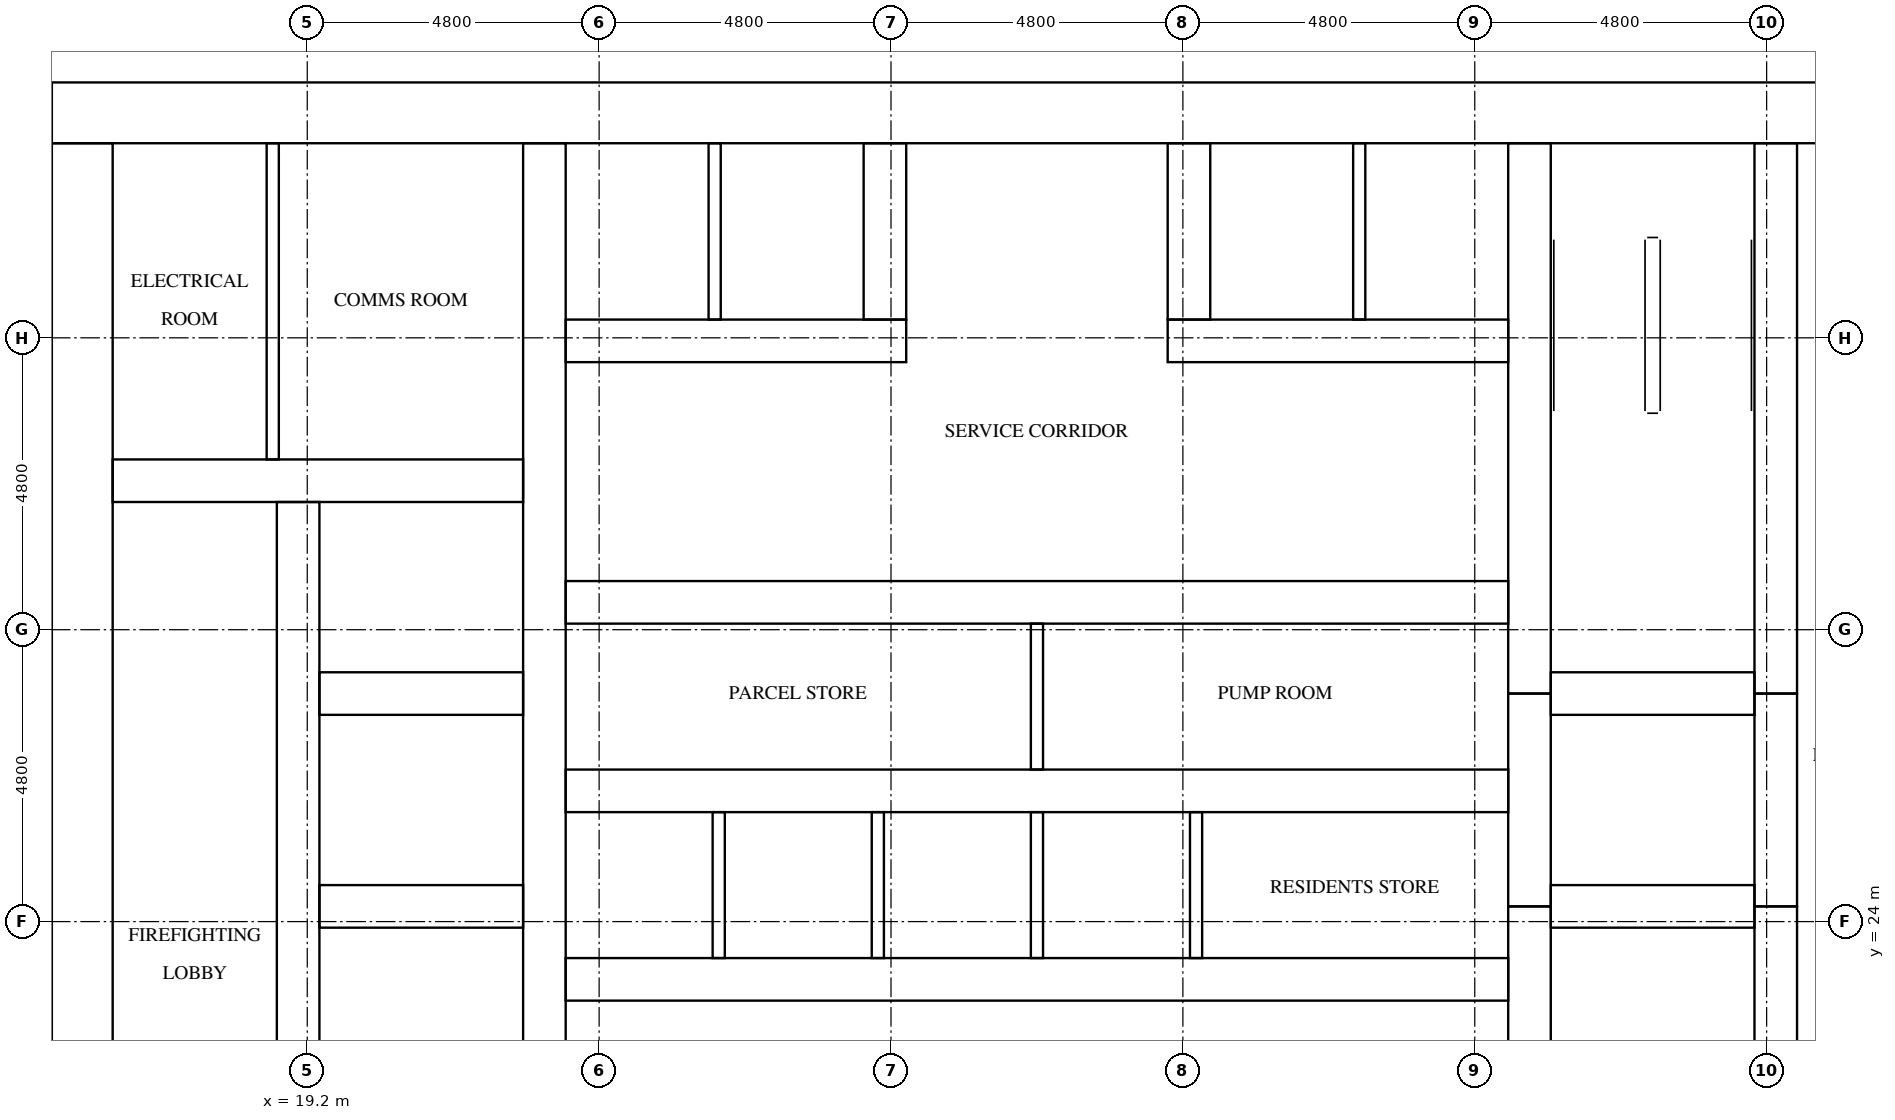
"""IFC4 building model, lengths in metres.
Left out: names, types, materials, properties, quantities, classifications, styles, units other than length and angle.
Written with IfcOpenShell. Run it as: python <this file> out.ifc"""

import sys

from ifc_helpers import new_model, si_unit, direction, frame, frame_2d, origin, place, context, subcontext, project, spatial, rectangle, extrude, element, fill, save


model = new_model("IFC4")
c1 = context("Model", 3, precision=1e-05, world=origin(), true_north=direction((0.0, 1.0)))
c2 = subcontext(c1, "Body", "Model", "MODEL_VIEW")
j1 = project(units=[si_unit("LENGTHUNIT", "METRE"), si_unit("PLANEANGLEUNIT", "RADIAN")], contexts=[c1])
p1 = place(None, origin())
s1 = spatial("IfcSite", under=j1, at=p1, CompositionType="ELEMENT")
p2 = place(p1, origin())
s2 = spatial("IfcBuilding", under=s1, at=p2, CompositionType="ELEMENT")
p3 = place(p2, frame((0.0, 0.0, 29.4)))
s3 = spatial("IfcBuildingStorey", under=s2, at=p3, CompositionType="ELEMENT", Elevation=29.4)
p4 = place(p3, frame((15.0, 37.3, 0.0), z_axis=(0.0, 0.0, 1.0), x_axis=(1.0, 0.0, 0.0)))
e1 = element("IfcWall", 1, at=p4, inside=s3, PredefinedType="SHEAR", context=c2, shape_type="SweptSolid", body=[
    extrude(rectangle(XDim=32.4, YDim=1.0, at=frame_2d((16.2, 0.0))), origin(), (0.0, 0.0, 1.0), 3.2),
])
p5 = place(p4, frame((15.3, 0.0, 0.0)))
e2 = element("IfcOpeningElement", 2, at=p5, cuts=e1, PredefinedType="OPENING", context=c2, shape_type="SweptSolid", body=[
    extrude(rectangle(XDim=1.8, YDim=2.1, at=frame_2d((0.9, 1.05))), frame((0.0, 0.51, 0.0), z_axis=(0.0, -1.0, 0.0), x_axis=(1.0, 0.0, 0.0)), (0.0, 0.0, 1.0), 1.02),
])
p6 = place(p4, frame((1.766, 0.0, 0.0)))
e3 = element("IfcOpeningElement", 3, at=p6, cuts=e1, PredefinedType="OPENING", context=c2, shape_type="SweptSolid", body=[
    extrude(rectangle(XDim=1.0, YDim=2.1, at=frame_2d((0.5, 1.05))), frame((0.0, 0.51, 0.0), z_axis=(0.0, -1.0, 0.0), x_axis=(1.0, 0.0, 0.0)), (0.0, 0.0, 1.0), 1.02),
])
p7 = place(p4, frame((5.241, 0.0, 0.0)))
e4 = element("IfcOpeningElement", 4, at=p7, cuts=e1, PredefinedType="OPENING", context=c2, shape_type="SweptSolid", body=[
    extrude(rectangle(XDim=1.0, YDim=2.1, at=frame_2d((0.5, 1.05))), frame((0.0, 0.51, 0.0), z_axis=(0.0, -1.0, 0.0), x_axis=(1.0, 0.0, 0.0)), (0.0, 0.0, 1.0), 1.02),
])
p8 = place(p3, frame((15.5, 16.0, 0.0), z_axis=(0.0, 0.0, 1.0), x_axis=(0.0, 1.0, 0.0)))
e5 = element("IfcWall", 5, at=p8, inside=s3, PredefinedType="SHEAR", context=c2, shape_type="SweptSolid", body=[
    extrude(rectangle(XDim=20.8, YDim=1.0, at=frame_2d((10.4, 0.0))), origin(), (0.0, 0.0, 1.0), 3.2),
])
p9 = place(p8, frame((4.76, 0.0, 0.0)))
e6 = element("IfcOpeningElement", 6, at=p9, cuts=e5, PredefinedType="OPENING", context=c2, shape_type="SweptSolid", body=[
    extrude(rectangle(XDim=1.2, YDim=2.1, at=frame_2d((0.6, 1.05))), frame((0.0, 0.51, 0.0), z_axis=(0.0, -1.0, 0.0), x_axis=(1.0, 0.0, 0.0)), (0.0, 0.0, 1.0), 1.02),
])
p10 = place(p3, frame((19.05, 16.0, 0.0), z_axis=(0.0, 0.0, 1.0), x_axis=(0.0, 1.0, 0.0)))
e7 = element("IfcWall", 7, at=p10, inside=s3, PredefinedType="SHEAR", context=c2, shape_type="SweptSolid", body=[
    extrude(rectangle(XDim=14.9, YDim=0.7, at=frame_2d((7.45, 0.0))), origin(), (0.0, 0.0, 1.0), 3.2),
])
p11 = place(p10, frame((9.45, 0.0, 0.0)))
e8 = element("IfcOpeningElement", 8, at=p11, cuts=e7, PredefinedType="OPENING", context=c2, shape_type="SweptSolid", body=[
    extrude(rectangle(XDim=1.1, YDim=2.1, at=frame_2d((0.55, 1.05))), frame((0.0, 0.36, 0.0), z_axis=(0.0, -1.0, 0.0), x_axis=(1.0, 0.0, 0.0)), (0.0, 0.0, 1.0), 0.72),
])
p12 = place(p10, frame((12.95, 0.0, 0.0)))
e9 = element("IfcOpeningElement", 9, at=p12, cuts=e7, PredefinedType="OPENING", context=c2, shape_type="SweptSolid", body=[
    extrude(rectangle(XDim=1.1, YDim=2.1, at=frame_2d((0.55, 1.05))), frame((0.0, 0.36, 0.0), z_axis=(0.0, -1.0, 0.0), x_axis=(1.0, 0.0, 0.0)), (0.0, 0.0, 1.0), 0.72),
])
p13 = place(p10, frame((0.2, 0.0, 0.0)))
e10 = element("IfcOpeningElement", 10, at=p13, cuts=e7, PredefinedType="OPENING", context=c2, shape_type="SweptSolid", body=[
    extrude(rectangle(XDim=1.2, YDim=2.1, at=frame_2d((0.6, 1.05))), frame((0.0, 0.36, 0.0), z_axis=(0.0, -1.0, 0.0), x_axis=(1.0, 0.0, 0.0)), (0.0, 0.0, 1.0), 0.72),
])
p14 = place(p3, frame((23.1, 16.0, 0.0), z_axis=(0.0, 0.0, 1.0), x_axis=(0.0, 1.0, 0.0)))
e11 = element("IfcWall", 11, at=p14, inside=s3, PredefinedType="SHEAR", context=c2, shape_type="SweptSolid", body=[
    extrude(rectangle(XDim=20.8, YDim=0.7, at=frame_2d((10.4, 0.0))), origin(), (0.0, 0.0, 1.0), 3.2),
])
p15 = place(p3, frame((39.3, 16.0, 0.0), z_axis=(0.0, 0.0, 1.0), x_axis=(0.0, 1.0, 0.0)))
e12 = element("IfcWall", 12, at=p15, inside=s3, PredefinedType="SHEAR", context=c2, shape_type="SweptSolid", body=[
    extrude(rectangle(XDim=8.25, YDim=0.7, at=frame_2d((4.125, 0.0))), origin(), (0.0, 0.0, 1.0), 3.2),
])
p16 = place(p3, frame((39.3, 24.25, 0.0), z_axis=(0.0, 0.0, 1.0), x_axis=(0.0, 1.0, 0.0)))
e13 = element("IfcWall", 13, at=p16, inside=s3, PredefinedType="SHEAR", context=c2, shape_type="SweptSolid", body=[
    extrude(rectangle(XDim=3.5, YDim=0.7, at=frame_2d((1.75, 0.0))), origin(), (0.0, 0.0, 1.0), 3.2),
])
p17 = place(p3, frame((39.3, 27.75, 0.0), z_axis=(0.0, 0.0, 1.0), x_axis=(0.0, 1.0, 0.0)))
e14 = element("IfcWall", 14, at=p17, inside=s3, PredefinedType="SHEAR", context=c2, shape_type="SweptSolid", body=[
    extrude(rectangle(XDim=9.05, YDim=0.7, at=frame_2d((4.525, 0.0))), origin(), (0.0, 0.0, 1.0), 3.2),
])
p18 = place(p3, frame((43.35, 16.0, 0.0), z_axis=(0.0, 0.0, 1.0), x_axis=(0.0, 1.0, 0.0)))
e15 = element("IfcWall", 15, at=p18, inside=s3, PredefinedType="SHEAR", context=c2, shape_type="SweptSolid", body=[
    extrude(rectangle(XDim=8.25, YDim=0.7, at=frame_2d((4.125, 0.0))), origin(), (0.0, 0.0, 1.0), 3.2),
])
p19 = place(p18, frame((0.2, 0.0, 0.0)))
e16 = element("IfcOpeningElement", 16, at=p19, cuts=e15, PredefinedType="OPENING", context=c2, shape_type="SweptSolid", body=[
    extrude(rectangle(XDim=1.2, YDim=2.1, at=frame_2d((0.6, 1.05))), frame((0.0, 0.36, 0.0), z_axis=(0.0, -1.0, 0.0), x_axis=(1.0, 0.0, 0.0)), (0.0, 0.0, 1.0), 0.72),
])
p20 = place(p3, frame((43.35, 24.25, 0.0), z_axis=(0.0, 0.0, 1.0), x_axis=(0.0, 1.0, 0.0)))
e17 = element("IfcWall", 17, at=p20, inside=s3, PredefinedType="SHEAR", context=c2, shape_type="SweptSolid", body=[
    extrude(rectangle(XDim=3.5, YDim=0.7, at=frame_2d((1.75, 0.0))), origin(), (0.0, 0.0, 1.0), 3.2),
])
p21 = place(p20, frame((1.2, 0.0, 0.0)))
e18 = element("IfcOpeningElement", 18, at=p21, cuts=e17, PredefinedType="OPENING", context=c2, shape_type="SweptSolid", body=[
    extrude(rectangle(XDim=1.1, YDim=2.1, at=frame_2d((0.55, 1.05))), frame((0.0, 0.36, 0.0), z_axis=(0.0, -1.0, 0.0), x_axis=(1.0, 0.0, 0.0)), (0.0, 0.0, 1.0), 0.72),
])
p22 = place(p3, frame((43.35, 27.75, 0.0), z_axis=(0.0, 0.0, 1.0), x_axis=(0.0, 1.0, 0.0)))
e19 = element("IfcWall", 19, at=p22, inside=s3, PredefinedType="SHEAR", context=c2, shape_type="SweptSolid", body=[
    extrude(rectangle(XDim=9.05, YDim=0.7, at=frame_2d((4.525, 0.0))), origin(), (0.0, 0.0, 1.0), 3.2),
])
p23 = place(p22, frame((7.65, 0.0, 0.0)))
e20 = element("IfcOpeningElement", 20, at=p23, cuts=e19, PredefinedType="OPENING", context=c2, shape_type="SweptSolid", body=[
    extrude(rectangle(XDim=1.2, YDim=2.1, at=frame_2d((0.6, 1.05))), frame((0.0, 0.36, 0.0), z_axis=(0.0, -1.0, 0.0), x_axis=(1.0, 0.0, 0.0)), (0.0, 0.0, 1.0), 0.72),
])
for number, where, z_axis, x_axis in (
    (21, (19.4, 24.25, 0.0), (0.0, 0.0, 1.0), (1.0, 0.0, 0.0)),
    (22, (19.4, 27.75, 0.0), (0.0, 0.0, 1.0), (1.0, 0.0, 0.0)),
):
    element("IfcWall", number, at=place(p3, frame(where, z_axis=z_axis, x_axis=x_axis)), inside=s3, PredefinedType="SHEAR", context=c2, shape_type="SweptSolid", body=[
        extrude(rectangle(XDim=3.35, YDim=0.7, at=frame_2d((1.675, 0.0))), origin(), (0.0, 0.0, 1.0), 3.2),
    ])
p24 = place(p3, frame((16.0, 31.25, 0.0), z_axis=(0.0, 0.0, 1.0), x_axis=(1.0, 0.0, 0.0)))
e23 = element("IfcWall", 23, at=p24, inside=s3, PredefinedType="SHEAR", context=c2, shape_type="SweptSolid", body=[
    extrude(rectangle(XDim=6.75, YDim=0.7, at=frame_2d((3.375, 0.0))), origin(), (0.0, 0.0, 1.0), 3.2),
])
for number, where, z_axis, x_axis in (
    (24, (39.65, 24.25, 0.0), (0.0, 0.0, 1.0), (1.0, 0.0, 0.0)),
    (25, (39.65, 27.75, 0.0), (0.0, 0.0, 1.0), (1.0, 0.0, 0.0)),
):
    element("IfcWall", number, at=place(p3, frame(where, z_axis=z_axis, x_axis=x_axis)), inside=s3, PredefinedType="SHEAR", context=c2, shape_type="SweptSolid", body=[
        extrude(rectangle(XDim=3.35, YDim=0.7, at=frame_2d((1.675, 0.0))), origin(), (0.0, 0.0, 1.0), 3.2),
    ])
p25 = place(p3, frame((23.45, 23.05, 0.0), z_axis=(0.0, 0.0, 1.0), x_axis=(1.0, 0.0, 0.0)))
e26 = element("IfcWall", 26, at=p25, inside=s3, PredefinedType="SHEAR", context=c2, shape_type="SweptSolid", body=[
    extrude(rectangle(XDim=15.5, YDim=0.7, at=frame_2d((7.75, 0.0))), origin(), (0.0, 0.0, 1.0), 3.2),
])
p26 = place(p25, frame((0.658, 0.0, 0.0)))
e27 = element("IfcOpeningElement", 27, at=p26, cuts=e26, PredefinedType="OPENING", context=c2, shape_type="SweptSolid", body=[
    extrude(rectangle(XDim=1.1, YDim=2.1, at=frame_2d((0.55, 1.05))), frame((0.0, 0.36, 0.0), z_axis=(0.0, -1.0, 0.0), x_axis=(1.0, 0.0, 0.0)), (0.0, 0.0, 1.0), 0.72),
])
p27 = place(p25, frame((3.275, 0.0, 0.0)))
e28 = element("IfcOpeningElement", 28, at=p27, cuts=e26, PredefinedType="OPENING", context=c2, shape_type="SweptSolid", body=[
    extrude(rectangle(XDim=1.1, YDim=2.1, at=frame_2d((0.55, 1.05))), frame((0.0, 0.36, 0.0), z_axis=(0.0, -1.0, 0.0), x_axis=(1.0, 0.0, 0.0)), (0.0, 0.0, 1.0), 0.72),
])
p28 = place(p25, frame((12.483, 0.0, 0.0)))
e29 = element("IfcOpeningElement", 29, at=p28, cuts=e26, PredefinedType="OPENING", context=c2, shape_type="SweptSolid", body=[
    extrude(rectangle(XDim=1.0, YDim=2.1, at=frame_2d((0.5, 1.05))), frame((0.0, 0.36, 0.0), z_axis=(0.0, -1.0, 0.0), x_axis=(1.0, 0.0, 0.0)), (0.0, 0.0, 1.0), 0.72),
])
p29 = place(p3, frame((23.45, 26.15, 0.0), z_axis=(0.0, 0.0, 1.0), x_axis=(1.0, 0.0, 0.0)))
e30 = element("IfcWall", 30, at=p29, inside=s3, PredefinedType="SHEAR", context=c2, shape_type="SweptSolid", body=[
    extrude(rectangle(XDim=15.5, YDim=0.7, at=frame_2d((7.75, 0.0))), origin(), (0.0, 0.0, 1.0), 3.2),
])
p30 = place(p3, frame((23.45, 29.25, 0.0), z_axis=(0.0, 0.0, 1.0), x_axis=(1.0, 0.0, 0.0)))
e31 = element("IfcWall", 31, at=p30, inside=s3, PredefinedType="SHEAR", context=c2, shape_type="SweptSolid", body=[
    extrude(rectangle(XDim=15.5, YDim=0.7, at=frame_2d((7.75, 0.0))), origin(), (0.0, 0.0, 1.0), 3.2),
])
p31 = place(p30, frame((3.325, 0.0, 0.0)))
e32 = element("IfcOpeningElement", 32, at=p31, cuts=e31, PredefinedType="OPENING", context=c2, shape_type="SweptSolid", body=[
    extrude(rectangle(XDim=1.0, YDim=2.1, at=frame_2d((0.5, 1.05))), frame((0.0, 0.36, 0.0), z_axis=(0.0, -1.0, 0.0), x_axis=(1.0, 0.0, 0.0)), (0.0, 0.0, 1.0), 0.72),
])
p32 = place(p30, frame((11.175, 0.0, 0.0)))
e33 = element("IfcOpeningElement", 33, at=p32, cuts=e31, PredefinedType="OPENING", context=c2, shape_type="SweptSolid", body=[
    extrude(rectangle(XDim=1.0, YDim=2.1, at=frame_2d((0.5, 1.05))), frame((0.0, 0.36, 0.0), z_axis=(0.0, -1.0, 0.0), x_axis=(1.0, 0.0, 0.0)), (0.0, 0.0, 1.0), 0.72),
])
p33 = place(p3, frame((23.45, 33.55, 0.0), z_axis=(0.0, 0.0, 1.0), x_axis=(1.0, 0.0, 0.0)))
e34 = element("IfcWall", 34, at=p33, inside=s3, PredefinedType="SHEAR", context=c2, shape_type="SweptSolid", body=[
    extrude(rectangle(XDim=5.6, YDim=0.7, at=frame_2d((2.8, 0.0))), origin(), (0.0, 0.0, 1.0), 3.2),
])
p34 = place(p3, frame((33.35, 33.55, 0.0), z_axis=(0.0, 0.0, 1.0), x_axis=(1.0, 0.0, 0.0)))
e35 = element("IfcWall", 35, at=p34, inside=s3, PredefinedType="SHEAR", context=c2, shape_type="SweptSolid", body=[
    extrude(rectangle(XDim=5.6, YDim=0.7, at=frame_2d((2.8, 0.0))), origin(), (0.0, 0.0, 1.0), 3.2),
])
for number, where, z_axis, x_axis in (
    (36, (28.7, 33.9, 0.0), (0.0, 0.0, 1.0), (0.0, 1.0, 0.0)),
    (37, (33.7, 33.9, 0.0), (0.0, 0.0, 1.0), (0.0, 1.0, 0.0)),
):
    element("IfcWall", number, at=place(p3, frame(where, z_axis=z_axis, x_axis=x_axis)), inside=s3, PredefinedType="SHEAR", context=c2, shape_type="SweptSolid", body=[
        extrude(rectangle(XDim=2.9, YDim=0.7, at=frame_2d((1.45, 0.0))), origin(), (0.0, 0.0, 1.0), 3.2),
    ])
for number, where, z_axis, x_axis in (
    (38, (25.967, 23.4, 0.0), (0.0, 0.0, 1.0), (0.0, 1.0, 0.0)),
    (39, (28.583, 23.4, 0.0), (0.0, 0.0, 1.0), (0.0, 1.0, 0.0)),
    (40, (31.2, 23.4, 0.0), (0.0, 0.0, 1.0), (0.0, 1.0, 0.0)),
    (41, (33.817, 23.4, 0.0), (0.0, 0.0, 1.0), (0.0, 1.0, 0.0)),
):
    element("IfcWall", number, at=place(p3, frame(where, z_axis=z_axis, x_axis=x_axis)), inside=s3, PredefinedType="SOLIDWALL", context=c2, shape_type="SweptSolid", body=[
        extrude(rectangle(XDim=2.4, YDim=0.2, at=frame_2d((1.2, 0.0))), origin(), (0.0, 0.0, 1.0), 3.2),
    ])
for number, where, z_axis, x_axis in (
    (42, (25.9, 33.9, 0.0), (0.0, 0.0, 1.0), (0.0, 1.0, 0.0)),
    (43, (36.5, 33.9, 0.0), (0.0, 0.0, 1.0), (0.0, 1.0, 0.0)),
):
    element("IfcWall", number, at=place(p3, frame(where, z_axis=z_axis, x_axis=x_axis)), inside=s3, PredefinedType="SOLIDWALL", context=c2, shape_type="SweptSolid", body=[
        extrude(rectangle(XDim=2.9, YDim=0.2, at=frame_2d((1.45, 0.0))), origin(), (0.0, 0.0, 1.0), 3.2),
    ])
p35 = place(p3, frame((18.633, 31.6, 0.0), z_axis=(0.0, 0.0, 1.0), x_axis=(0.0, 1.0, 0.0)))
e44 = element("IfcWall", 44, at=p35, inside=s3, PredefinedType="PARTITIONING", context=c2, shape_type="SweptSolid", body=[
    extrude(rectangle(XDim=5.2, YDim=0.2, at=frame_2d((2.6, 0.0))), origin(), (0.0, 0.0, 1.0), 3.2),
])
p36 = place(p3, frame((31.2, 26.5, 0.0), z_axis=(0.0, 0.0, 1.0), x_axis=(0.0, 1.0, 0.0)))
e45 = element("IfcWall", 45, at=p36, inside=s3, PredefinedType="PARTITIONING", context=c2, shape_type="SweptSolid", body=[
    extrude(rectangle(XDim=2.4, YDim=0.2, at=frame_2d((1.2, 0.0))), origin(), (0.0, 0.0, 1.0), 3.2),
])
p37 = place(p26, origin())
e46 = element("IfcDoor", 46, at=p37, inside=s3, OperationType="DOUBLE_DOOR_SLIDING", PredefinedType="DOOR", context=c2, shape_type="SweptSolid", body=[
    extrude(rectangle(XDim=1.1, YDim=2.1, at=frame_2d((0.55, 1.05))), frame((0.0, 0.025, 0.0), z_axis=(0.0, -1.0, 0.0), x_axis=(1.0, 0.0, 0.0)), (0.0, 0.0, 1.0), 0.05),
])
fill(e27, e46)
p38 = place(p27, origin())
e47 = element("IfcDoor", 47, at=p38, inside=s3, OperationType="DOUBLE_DOOR_SLIDING", PredefinedType="DOOR", context=c2, shape_type="SweptSolid", body=[
    extrude(rectangle(XDim=1.1, YDim=2.1, at=frame_2d((0.55, 1.05))), frame((0.0, 0.025, 0.0), z_axis=(0.0, -1.0, 0.0), x_axis=(1.0, 0.0, 0.0)), (0.0, 0.0, 1.0), 0.05),
])
fill(e28, e47)
p39 = place(p11, origin())
e48 = element("IfcDoor", 48, at=p39, inside=s3, OperationType="DOUBLE_DOOR_SLIDING", PredefinedType="DOOR", context=c2, shape_type="SweptSolid", body=[
    extrude(rectangle(XDim=1.1, YDim=2.1, at=frame_2d((0.55, 1.05))), frame((0.0, 0.025, 0.0), z_axis=(0.0, -1.0, 0.0), x_axis=(1.0, 0.0, 0.0)), (0.0, 0.0, 1.0), 0.05),
])
fill(e8, e48)
p40 = place(p12, origin())
e49 = element("IfcDoor", 49, at=p40, inside=s3, OperationType="DOUBLE_DOOR_SLIDING", PredefinedType="DOOR", context=c2, shape_type="SweptSolid", body=[
    extrude(rectangle(XDim=1.1, YDim=2.1, at=frame_2d((0.55, 1.05))), frame((0.0, 0.025, 0.0), z_axis=(0.0, -1.0, 0.0), x_axis=(1.0, 0.0, 0.0)), (0.0, 0.0, 1.0), 0.05),
])
fill(e9, e49)
p41 = place(p21, origin())
e50 = element("IfcDoor", 50, at=p41, inside=s3, OperationType="DOUBLE_DOOR_SLIDING", PredefinedType="DOOR", context=c2, shape_type="SweptSolid", body=[
    extrude(rectangle(XDim=1.1, YDim=2.1, at=frame_2d((0.55, 1.05))), frame((0.0, 0.025, 0.0), z_axis=(0.0, -1.0, 0.0), x_axis=(1.0, 0.0, 0.0)), (0.0, 0.0, 1.0), 0.05),
])
fill(e18, e50)
p42 = place(p23, origin())
e51 = element("IfcDoor", 51, at=p42, inside=s3, OperationType="SINGLE_SWING_RIGHT", PredefinedType="DOOR", context=c2, shape_type="SweptSolid", body=[
    extrude(rectangle(XDim=1.2, YDim=2.1, at=frame_2d((0.6, 1.05))), frame((0.0, 0.025, 0.0), z_axis=(0.0, -1.0, 0.0), x_axis=(1.0, 0.0, 0.0)), (0.0, 0.0, 1.0), 0.05),
])
fill(e20, e51)
p43 = place(p5, origin())
e52 = element("IfcDoor", 52, at=p43, inside=s3, OperationType="DOUBLE_DOOR_SINGLE_SWING", PredefinedType="DOOR", context=c2, shape_type="SweptSolid", body=[
    extrude(rectangle(XDim=1.8, YDim=2.1, at=frame_2d((0.9, 1.05))), frame((0.0, 0.025, 0.0), z_axis=(0.0, -1.0, 0.0), x_axis=(1.0, 0.0, 0.0)), (0.0, 0.0, 1.0), 0.05),
])
fill(e2, e52)
p44 = place(p6, origin())
e53 = element("IfcDoor", 53, at=p44, inside=s3, OperationType="SINGLE_SWING_LEFT", PredefinedType="DOOR", context=c2, shape_type="SweptSolid", body=[
    extrude(rectangle(XDim=1.0, YDim=2.1, at=frame_2d((0.5, 1.05))), frame((0.0, 0.025, 0.0), z_axis=(0.0, -1.0, 0.0), x_axis=(1.0, 0.0, 0.0)), (0.0, 0.0, 1.0), 0.05),
])
fill(e3, e53)
p45 = place(p7, origin())
e54 = element("IfcDoor", 54, at=p45, inside=s3, OperationType="SINGLE_SWING_RIGHT", PredefinedType="DOOR", context=c2, shape_type="SweptSolid", body=[
    extrude(rectangle(XDim=1.0, YDim=2.1, at=frame_2d((0.5, 1.05))), frame((0.0, 0.025, 0.0), z_axis=(0.0, -1.0, 0.0), x_axis=(1.0, 0.0, 0.0)), (0.0, 0.0, 1.0), 0.05),
])
fill(e4, e54)
p46 = place(p28, frame((1.0, 0.0, 0.0), z_axis=(0.0, 0.0, 1.0), x_axis=(-1.0, 0.0, 0.0)))
e55 = element("IfcDoor", 55, at=p46, inside=s3, OperationType="SINGLE_SWING_LEFT", PredefinedType="DOOR", context=c2, shape_type="SweptSolid", body=[
    extrude(rectangle(XDim=1.0, YDim=2.1, at=frame_2d((0.5, 1.05))), frame((0.0, 0.025, 0.0), z_axis=(0.0, -1.0, 0.0), x_axis=(1.0, 0.0, 0.0)), (0.0, 0.0, 1.0), 0.05),
])
fill(e29, e55)
p47 = place(p31, origin())
e56 = element("IfcDoor", 56, at=p47, inside=s3, OperationType="SINGLE_SWING_RIGHT", PredefinedType="DOOR", context=c2, shape_type="SweptSolid", body=[
    extrude(rectangle(XDim=1.0, YDim=2.1, at=frame_2d((0.5, 1.05))), frame((0.0, 0.025, 0.0), z_axis=(0.0, -1.0, 0.0), x_axis=(1.0, 0.0, 0.0)), (0.0, 0.0, 1.0), 0.05),
])
fill(e32, e56)
p48 = place(p32, origin())
e57 = element("IfcDoor", 57, at=p48, inside=s3, OperationType="SINGLE_SWING_LEFT", PredefinedType="DOOR", context=c2, shape_type="SweptSolid", body=[
    extrude(rectangle(XDim=1.0, YDim=2.1, at=frame_2d((0.5, 1.05))), frame((0.0, 0.025, 0.0), z_axis=(0.0, -1.0, 0.0), x_axis=(1.0, 0.0, 0.0)), (0.0, 0.0, 1.0), 0.05),
])
fill(e33, e57)
save(model, sys.argv[1])
